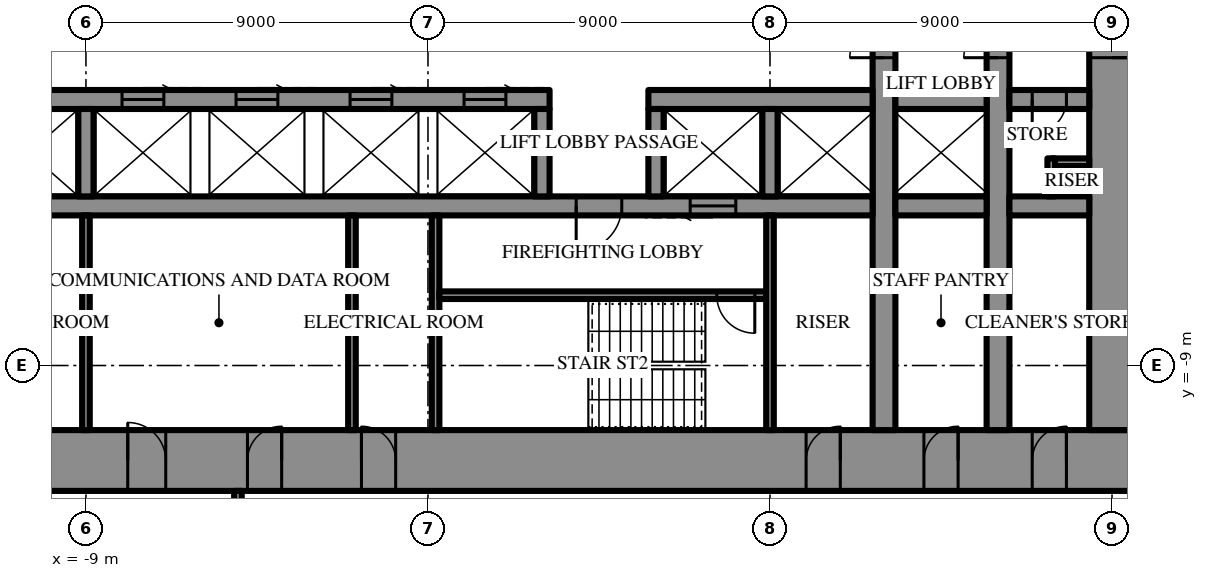
"""IFC4 building model, lengths in metres.
Left out: names, types, materials, properties, quantities, classifications, styles, units other than length and angle.
Written with IfcOpenShell. Run it as: python <this file> out.ifc"""

import sys

from ifc_helpers import new_model, si_unit, direction, frame, frame_2d, origin, place, context, subcontext, project, spatial, rectangle, extrude, element, fill, save


model = new_model("IFC4")
c1 = context("Model", 3, precision=1e-05, world=origin(), true_north=direction((0.0, 1.0)))
c2 = subcontext(c1, "Body", "Model", "MODEL_VIEW")
j1 = project(units=[si_unit("LENGTHUNIT", "METRE"), si_unit("PLANEANGLEUNIT", "RADIAN")], contexts=[c1])
p1 = place(None, origin())
s1 = spatial("IfcSite", under=j1, at=p1, CompositionType="ELEMENT")
p2 = place(p1, origin())
s2 = spatial("IfcBuilding", under=s1, at=p2, CompositionType="ELEMENT")
p3 = place(p2, frame((0.0, 0.0, 178.3)))
s3 = spatial("IfcBuildingStorey", under=s2, at=p3, CompositionType="ELEMENT", Elevation=178.3)
p4 = place(p3, frame((18.6, -11.5, 0.0), z_axis=(0.0, 0.0, 1.0), x_axis=(-1.0, 0.0, 0.0)))
e1 = element("IfcWall", 1, at=p4, inside=s3, PredefinedType="SHEAR", context=c2, shape_type="SweptSolid", body=[
    extrude(rectangle(XDim=37.2, YDim=1.6, at=frame_2d((18.6, 0.0))), origin(), (0.0, 0.0, 1.0), 4.2),
])
p5 = place(p4, frame((19.45, 0.0, 0.0)))
e2 = element("IfcOpeningElement", 2, at=p5, cuts=e1, PredefinedType="OPENING", context=c2, shape_type="SweptSolid", body=[
    extrude(rectangle(XDim=0.9, YDim=2.2, at=frame_2d((0.45, 1.1))), frame((0.0, 0.81, 0.0), z_axis=(0.0, -1.0, 0.0), x_axis=(1.0, 0.0, 0.0)), (0.0, 0.0, 1.0), 1.62),
])
p6 = place(p4, frame((22.45, 0.0, 0.0)))
e3 = element("IfcOpeningElement", 3, at=p6, cuts=e1, PredefinedType="OPENING", context=c2, shape_type="SweptSolid", body=[
    extrude(rectangle(XDim=0.9, YDim=2.2, at=frame_2d((0.45, 1.1))), frame((0.0, 0.81, 0.0), z_axis=(0.0, -1.0, 0.0), x_axis=(1.0, 0.0, 0.0)), (0.0, 0.0, 1.0), 1.62),
])
p7 = place(p4, frame((25.5, 0.0, 0.0)))
e4 = element("IfcOpeningElement", 4, at=p7, cuts=e1, PredefinedType="OPENING", context=c2, shape_type="SweptSolid", body=[
    extrude(rectangle(XDim=1.0, YDim=2.2, at=frame_2d((0.5, 1.1))), frame((0.0, 0.81, 0.0), z_axis=(0.0, -1.0, 0.0), x_axis=(1.0, 0.0, 0.0)), (0.0, 0.0, 1.0), 1.62),
])
p8 = place(p4, frame((1.8, 0.0, 0.0)))
e5 = element("IfcOpeningElement", 5, at=p8, cuts=e1, PredefinedType="OPENING", context=c2, shape_type="SweptSolid", body=[
    extrude(rectangle(XDim=0.9, YDim=2.2, at=frame_2d((0.45, 1.1))), frame((0.0, 0.81, 0.0), z_axis=(0.0, -1.0, 0.0), x_axis=(1.0, 0.0, 0.0)), (0.0, 0.0, 1.0), 1.62),
])
p9 = place(p4, frame((4.65, 0.0, 0.0)))
e6 = element("IfcOpeningElement", 6, at=p9, cuts=e1, PredefinedType="OPENING", context=c2, shape_type="SweptSolid", body=[
    extrude(rectangle(XDim=0.9, YDim=2.2, at=frame_2d((0.45, 1.1))), frame((0.0, 0.81, 0.0), z_axis=(0.0, -1.0, 0.0), x_axis=(1.0, 0.0, 0.0)), (0.0, 0.0, 1.0), 1.62),
])
p10 = place(p4, frame((7.75, 0.0, 0.0)))
e7 = element("IfcOpeningElement", 7, at=p10, cuts=e1, PredefinedType="OPENING", context=c2, shape_type="SweptSolid", body=[
    extrude(rectangle(XDim=0.9, YDim=2.2, at=frame_2d((0.45, 1.1))), frame((0.0, 0.81, 0.0), z_axis=(0.0, -1.0, 0.0), x_axis=(1.0, 0.0, 0.0)), (0.0, 0.0, 1.0), 1.62),
])
p11 = place(p4, frame((28.55, 0.0, 0.0)))
e8 = element("IfcOpeningElement", 8, at=p11, cuts=e1, PredefinedType="OPENING", context=c2, shape_type="SweptSolid", body=[
    extrude(rectangle(XDim=0.9, YDim=2.2, at=frame_2d((0.45, 1.1))), frame((0.0, 0.81, 0.0), z_axis=(0.0, -1.0, 0.0), x_axis=(1.0, 0.0, 0.0)), (0.0, 0.0, 1.0), 1.62),
])
p12 = place(p4, frame((31.65, 0.0, 0.0)))
e9 = element("IfcOpeningElement", 9, at=p12, cuts=e1, PredefinedType="OPENING", context=c2, shape_type="SweptSolid", body=[
    extrude(rectangle(XDim=0.9, YDim=2.2, at=frame_2d((0.45, 1.1))), frame((0.0, 0.81, 0.0), z_axis=(0.0, -1.0, 0.0), x_axis=(1.0, 0.0, 0.0)), (0.0, 0.0, 1.0), 1.62),
])
p13 = place(p4, frame((34.5, 0.0, 0.0)))
e10 = element("IfcOpeningElement", 10, at=p13, cuts=e1, PredefinedType="OPENING", context=c2, shape_type="SweptSolid", body=[
    extrude(rectangle(XDim=0.9, YDim=2.2, at=frame_2d((0.45, 1.1))), frame((0.0, 0.81, 0.0), z_axis=(0.0, -1.0, 0.0), x_axis=(1.0, 0.0, 0.0)), (0.0, 0.0, 1.0), 1.62),
])
p14 = place(p3, frame((18.0, -10.7, 0.0), z_axis=(0.0, 0.0, 1.0), x_axis=(0.0, 1.0, 0.0)))
e11 = element("IfcWall", 11, at=p14, inside=s3, PredefinedType="SHEAR", context=c2, shape_type="SweptSolid", body=[
    extrude(rectangle(XDim=21.4, YDim=1.2, at=frame_2d((10.7, 0.0))), origin(), (0.0, 0.0, 1.0), 4.2),
])
p15 = place(p14, frame((9.8, 0.0, 0.0)))
e12 = element("IfcOpeningElement", 12, at=p15, cuts=e11, PredefinedType="OPENING", context=c2, shape_type="SweptSolid", body=[
    extrude(rectangle(XDim=1.8, YDim=2.4, at=frame_2d((0.9, 1.2))), frame((0.0, 0.61, 0.0), z_axis=(0.0, -1.0, 0.0), x_axis=(1.0, 0.0, 0.0)), (0.0, 0.0, 1.0), 1.22),
])
p16 = place(p3, frame((12.0, -10.7, 0.0), z_axis=(0.0, 0.0, 1.0), x_axis=(0.0, 1.0, 0.0)))
e13 = element("IfcWall", 13, at=p16, inside=s3, PredefinedType="SHEAR", context=c2, shape_type="SweptSolid", body=[
    extrude(rectangle(XDim=21.4, YDim=0.6, at=frame_2d((10.7, 0.0))), origin(), (0.0, 0.0, 1.0), 4.2),
])
p17 = place(p16, frame((9.8, 0.0, 0.0)))
e14 = element("IfcOpeningElement", 14, at=p17, cuts=e13, PredefinedType="OPENING", context=c2, shape_type="SweptSolid", body=[
    extrude(rectangle(XDim=1.8, YDim=2.4, at=frame_2d((0.9, 1.2))), frame((0.0, 0.31, 0.0), z_axis=(0.0, -1.0, 0.0), x_axis=(1.0, 0.0, 0.0)), (0.0, 0.0, 1.0), 0.62),
])
p18 = place(p3, frame((15.0, -10.7, 0.0), z_axis=(0.0, 0.0, 1.0), x_axis=(0.0, 1.0, 0.0)))
e15 = element("IfcWall", 15, at=p18, inside=s3, PredefinedType="SHEAR", context=c2, shape_type="SweptSolid", body=[
    extrude(rectangle(XDim=21.4, YDim=0.6, at=frame_2d((10.7, 0.0))), origin(), (0.0, 0.0, 1.0), 4.2),
])
p19 = place(p18, frame((9.8, 0.0, 0.0)))
e16 = element("IfcOpeningElement", 16, at=p19, cuts=e15, PredefinedType="OPENING", context=c2, shape_type="SweptSolid", body=[
    extrude(rectangle(XDim=1.8, YDim=2.4, at=frame_2d((0.9, 1.2))), frame((0.0, 0.31, 0.0), z_axis=(0.0, -1.0, 0.0), x_axis=(1.0, 0.0, 0.0)), (0.0, 0.0, 1.0), 0.62),
])
p20 = place(p3, frame((17.4, -2.0, 0.0), z_axis=(0.0, 0.0, 1.0), x_axis=(-1.0, 0.0, 0.0)))
e17 = element("IfcWall", 17, at=p20, inside=s3, PredefinedType="SHEAR", context=c2, shape_type="SweptSolid", body=[
    extrude(rectangle(XDim=2.1, YDim=0.5, at=frame_2d((1.05, 0.0))), origin(), (0.0, 0.0, 1.0), 4.2),
])
p21 = place(p20, frame((0.6, 0.0, 0.0)))
e18 = element("IfcOpeningElement", 18, at=p21, cuts=e17, PredefinedType="OPENING", context=c2, shape_type="SweptSolid", body=[
    extrude(rectangle(XDim=0.9, YDim=2.2, at=frame_2d((0.45, 1.1))), frame((0.0, 0.26, 0.0), z_axis=(0.0, -1.0, 0.0), x_axis=(1.0, 0.0, 0.0)), (0.0, 0.0, 1.0), 0.52),
])
p22 = place(p3, frame((14.7, -2.0, 0.0), z_axis=(0.0, 0.0, 1.0), x_axis=(-1.0, 0.0, 0.0)))
e19 = element("IfcWall", 19, at=p22, inside=s3, PredefinedType="SHEAR", context=c2, shape_type="SweptSolid", body=[
    extrude(rectangle(XDim=2.4, YDim=0.5, at=frame_2d((1.2, 0.0))), origin(), (0.0, 0.0, 1.0), 4.2),
])
p23 = place(p3, frame((11.7, -2.0, 0.0), z_axis=(0.0, 0.0, 1.0), x_axis=(-1.0, 0.0, 0.0)))
e20 = element("IfcWall", 20, at=p23, inside=s3, PredefinedType="SHEAR", context=c2, shape_type="SweptSolid", body=[
    extrude(rectangle(XDim=5.9, YDim=0.5, at=frame_2d((2.95, 0.0))), origin(), (0.0, 0.0, 1.0), 4.2),
])
p24 = place(p3, frame((3.2, -2.0, 0.0), z_axis=(0.0, 0.0, 1.0), x_axis=(-1.0, 0.0, 0.0)))
e21 = element("IfcWall", 21, at=p24, inside=s3, PredefinedType="SHEAR", context=c2, shape_type="SweptSolid", body=[
    extrude(rectangle(XDim=14.9, YDim=0.5, at=frame_2d((7.45, 0.0))), origin(), (0.0, 0.0, 1.0), 4.2),
])
p25 = place(p24, frame((1.15, 0.0, 0.0)))
e22 = element("IfcOpeningElement", 22, at=p25, cuts=e21, PredefinedType="OPENING", context=c2, shape_type="SweptSolid", body=[
    extrude(rectangle(XDim=1.1, YDim=2.2, at=frame_2d((0.55, 1.1))), frame((0.0, 0.26, 0.0), z_axis=(0.0, -1.0, 0.0), x_axis=(1.0, 0.0, 0.0)), (0.0, 0.0, 1.0), 0.52),
])
p26 = place(p24, frame((4.15, 0.0, 0.0)))
e23 = element("IfcOpeningElement", 23, at=p26, cuts=e21, PredefinedType="OPENING", context=c2, shape_type="SweptSolid", body=[
    extrude(rectangle(XDim=1.1, YDim=2.2, at=frame_2d((0.55, 1.1))), frame((0.0, 0.26, 0.0), z_axis=(0.0, -1.0, 0.0), x_axis=(1.0, 0.0, 0.0)), (0.0, 0.0, 1.0), 0.52),
])
p27 = place(p24, frame((7.15, 0.0, 0.0)))
e24 = element("IfcOpeningElement", 24, at=p27, cuts=e21, PredefinedType="OPENING", context=c2, shape_type="SweptSolid", body=[
    extrude(rectangle(XDim=1.1, YDim=2.2, at=frame_2d((0.55, 1.1))), frame((0.0, 0.26, 0.0), z_axis=(0.0, -1.0, 0.0), x_axis=(1.0, 0.0, 0.0)), (0.0, 0.0, 1.0), 0.52),
])
p28 = place(p24, frame((10.15, 0.0, 0.0)))
e25 = element("IfcOpeningElement", 25, at=p28, cuts=e21, PredefinedType="OPENING", context=c2, shape_type="SweptSolid", body=[
    extrude(rectangle(XDim=1.1, YDim=2.2, at=frame_2d((0.55, 1.1))), frame((0.0, 0.26, 0.0), z_axis=(0.0, -1.0, 0.0), x_axis=(1.0, 0.0, 0.0)), (0.0, 0.0, 1.0), 0.52),
])
p29 = place(p3, frame((17.4, -4.8, 0.0), z_axis=(0.0, 0.0, 1.0), x_axis=(-1.0, 0.0, 0.0)))
e26 = element("IfcWall", 26, at=p29, inside=s3, PredefinedType="SHEAR", context=c2, shape_type="SweptSolid", body=[
    extrude(rectangle(XDim=2.1, YDim=0.5, at=frame_2d((1.05, 0.0))), origin(), (0.0, 0.0, 1.0), 4.2),
])
p30 = place(p3, frame((14.7, -4.8, 0.0), z_axis=(0.0, 0.0, 1.0), x_axis=(-1.0, 0.0, 0.0)))
e27 = element("IfcWall", 27, at=p30, inside=s3, PredefinedType="SHEAR", context=c2, shape_type="SweptSolid", body=[
    extrude(rectangle(XDim=2.4, YDim=0.5, at=frame_2d((1.2, 0.0))), origin(), (0.0, 0.0, 1.0), 4.2),
])
p31 = place(p3, frame((11.7, -4.8, 0.0), z_axis=(0.0, 0.0, 1.0), x_axis=(-1.0, 0.0, 0.0)))
e28 = element("IfcWall", 28, at=p31, inside=s3, PredefinedType="SHEAR", context=c2, shape_type="SweptSolid", body=[
    extrude(rectangle(XDim=23.4, YDim=0.5, at=frame_2d((11.7, 0.0))), origin(), (0.0, 0.0, 1.0), 4.2),
])
p32 = place(p31, frame((6.6, 0.0, 0.0)))
e29 = element("IfcOpeningElement", 29, at=p32, cuts=e28, PredefinedType="OPENING", context=c2, shape_type="SweptSolid", body=[
    extrude(rectangle(XDim=1.2, YDim=2.2, at=frame_2d((0.6, 1.1))), frame((0.0, 0.26, 0.0), z_axis=(0.0, -1.0, 0.0), x_axis=(1.0, 0.0, 0.0)), (0.0, 0.0, 1.0), 0.52),
])
p33 = place(p31, frame((3.6, 0.0, 0.0)))
e30 = element("IfcOpeningElement", 30, at=p33, cuts=e28, PredefinedType="OPENING", context=c2, shape_type="SweptSolid", body=[
    extrude(rectangle(XDim=1.2, YDim=2.2, at=frame_2d((0.6, 1.1))), frame((0.0, 0.26, 0.0), z_axis=(0.0, -1.0, 0.0), x_axis=(1.0, 0.0, 0.0)), (0.0, 0.0, 1.0), 0.52),
])
for number, where, z_axis, x_axis in (
    (31, (9.0, -2.25, 0.0), (0.0, 0.0, 1.0), (0.0, -1.0, 0.0)),
    (32, (6.0, -2.25, 0.0), (0.0, 0.0, 1.0), (0.0, -1.0, 0.0)),
    (33, (3.0, -2.25, 0.0), (0.0, 0.0, 1.0), (0.0, -1.0, 0.0)),
    (34, (-9.0, -2.25, 0.0), (0.0, 0.0, 1.0), (0.0, -1.0, 0.0)),
):
    element("IfcWall", number, at=place(p3, frame(where, z_axis=z_axis, x_axis=x_axis)), inside=s3, PredefinedType="SHEAR", context=c2, shape_type="SweptSolid", body=[
        extrude(rectangle(XDim=2.3, YDim=0.4, at=frame_2d((1.15, 0.0))), origin(), (0.0, 0.0, 1.0), 4.2),
    ])
p34 = place(p3, frame((0.2, -5.05, 0.0), z_axis=(0.0, 0.0, 1.0), x_axis=(0.0, -1.0, 0.0)))
e35 = element("IfcWall", 35, at=p34, inside=s3, PredefinedType="SHEAR", context=c2, shape_type="SweptSolid", body=[
    extrude(rectangle(XDim=5.65, YDim=0.2, at=frame_2d((2.825, 0.0))), origin(), (0.0, 0.0, 1.0), 4.2),
])
p35 = place(p3, frame((8.9, -7.15, 0.0), z_axis=(0.0, 0.0, 1.0), x_axis=(-1.0, 0.0, 0.0)))
e36 = element("IfcWall", 36, at=p35, inside=s3, PredefinedType="SHEAR", context=c2, shape_type="SweptSolid", body=[
    extrude(rectangle(XDim=8.6, YDim=0.2, at=frame_2d((4.3, 0.0))), origin(), (0.0, 0.0, 1.0), 4.2),
])
p36 = place(p35, frame((0.3, 0.0, 0.0)))
e37 = element("IfcOpeningElement", 37, at=p36, cuts=e36, PredefinedType="OPENING", context=c2, shape_type="SweptSolid", body=[
    extrude(rectangle(XDim=1.0, YDim=2.2, at=frame_2d((0.5, 1.1))), frame((0.0, 0.11, 0.0), z_axis=(0.0, -1.0, 0.0), x_axis=(1.0, 0.0, 0.0)), (0.0, 0.0, 1.0), 0.22),
])
for number, where, z_axis, x_axis in (
    (38, (9.0, -5.05, 0.0), (0.0, 0.0, 1.0), (0.0, -1.0, 0.0)),
    (39, (-9.0, -5.05, 0.0), (0.0, 0.0, 1.0), (0.0, -1.0, 0.0)),
    (40, (-2.0, -5.05, 0.0), (0.0, 0.0, 1.0), (0.0, -1.0, 0.0)),
):
    element("IfcWall", number, at=place(p3, frame(where, z_axis=z_axis, x_axis=x_axis)), inside=s3, PredefinedType="PARTITIONING", context=c2, shape_type="SweptSolid", body=[
        extrude(rectangle(XDim=5.65, YDim=0.2, at=frame_2d((2.825, 0.0))), origin(), (0.0, 0.0, 1.0), 4.0),
    ])
for number, where, z_axis, x_axis in (
    (41, (17.4, -3.65, 0.0), (0.0, 0.0, 1.0), (-1.0, 0.0, 0.0)),
    (42, (16.4, -3.55, 0.0), (0.0, 0.0, 1.0), (0.0, -1.0, 0.0)),
):
    element("IfcWall", number, at=place(p3, frame(where, z_axis=z_axis, x_axis=x_axis)), inside=s3, PredefinedType="PARTITIONING", context=c2, shape_type="SweptSolid", body=[
        extrude(rectangle(XDim=1.0, YDim=0.2, at=frame_2d((0.5, 0.0))), origin(), (0.0, 0.0, 1.0), 4.0),
    ])
p37 = place(p3, frame((-5.0, -12.3, 0.0), z_axis=(0.0, 0.0, 1.0), x_axis=(0.0, -1.0, 0.0)))
e43 = element("IfcWall", 43, at=p37, inside=s3, PredefinedType="PARTITIONING", context=c2, shape_type="SweptSolid", body=[
    extrude(rectangle(XDim=1.7, YDim=0.2, at=frame_2d((0.85, 0.0))), origin(), (0.0, 0.0, 1.0), 2.992),
])
p38 = place(p37, frame((0.35, 0.0, 0.0)))
e44 = element("IfcOpeningElement", 44, at=p38, cuts=e43, PredefinedType="OPENING", context=c2, shape_type="SweptSolid", body=[
    extrude(rectangle(XDim=1.0, YDim=2.2, at=frame_2d((0.5, 1.1))), frame((0.0, 0.11, 0.0), z_axis=(0.0, -1.0, 0.0), x_axis=(1.0, 0.0, 0.0)), (0.0, 0.0, 1.0), 0.22),
])
p39 = place(p15, frame((1.8, 0.0, 0.0), z_axis=(0.0, 0.0, 1.0), x_axis=(-1.0, 0.0, 0.0)))
e45 = element("IfcDoor", 45, at=p39, inside=s3, OperationType="DOUBLE_DOOR_SINGLE_SWING", PredefinedType="DOOR", context=c2, shape_type="SweptSolid", body=[
    extrude(rectangle(XDim=1.8, YDim=2.4, at=frame_2d((0.9, 1.2))), frame((0.0, 0.025, 0.0), z_axis=(0.0, -1.0, 0.0), x_axis=(1.0, 0.0, 0.0)), (0.0, 0.0, 1.0), 0.05),
])
fill(e12, e45)
p40 = place(p32, origin())
e46 = element("IfcDoor", 46, at=p40, inside=s3, OperationType="SINGLE_SWING_LEFT", PredefinedType="DOOR", context=c2, shape_type="SweptSolid", body=[
    extrude(rectangle(XDim=1.2, YDim=2.2, at=frame_2d((0.6, 1.1))), frame((0.0, 0.025, 0.0), z_axis=(0.0, -1.0, 0.0), x_axis=(1.0, 0.0, 0.0)), (0.0, 0.0, 1.0), 0.05),
])
fill(e29, e46)
p41 = place(p36, origin())
e47 = element("IfcDoor", 47, at=p41, inside=s3, OperationType="SINGLE_SWING_RIGHT", PredefinedType="DOOR", context=c2, shape_type="SweptSolid", body=[
    extrude(rectangle(XDim=1.0, YDim=2.2, at=frame_2d((0.5, 1.1))), frame((0.0, 0.025, 0.0), z_axis=(0.0, -1.0, 0.0), x_axis=(1.0, 0.0, 0.0)), (0.0, 0.0, 1.0), 0.05),
])
fill(e37, e47)
p42 = place(p5, frame((0.9, 0.0, 0.0), z_axis=(0.0, 0.0, 1.0), x_axis=(-1.0, 0.0, 0.0)))
e48 = element("IfcDoor", 48, at=p42, inside=s3, OperationType="SINGLE_SWING_RIGHT", PredefinedType="DOOR", context=c2, shape_type="SweptSolid", body=[
    extrude(rectangle(XDim=0.9, YDim=2.2, at=frame_2d((0.45, 1.1))), frame((0.0, 0.025, 0.0), z_axis=(0.0, -1.0, 0.0), x_axis=(1.0, 0.0, 0.0)), (0.0, 0.0, 1.0), 0.05),
])
fill(e2, e48)
p43 = place(p6, frame((0.9, 0.0, 0.0), z_axis=(0.0, 0.0, 1.0), x_axis=(-1.0, 0.0, 0.0)))
e49 = element("IfcDoor", 49, at=p43, inside=s3, OperationType="SINGLE_SWING_LEFT", PredefinedType="DOOR", context=c2, shape_type="SweptSolid", body=[
    extrude(rectangle(XDim=0.9, YDim=2.2, at=frame_2d((0.45, 1.1))), frame((0.0, 0.025, 0.0), z_axis=(0.0, -1.0, 0.0), x_axis=(1.0, 0.0, 0.0)), (0.0, 0.0, 1.0), 0.05),
])
fill(e3, e49)
p44 = place(p7, frame((1.0, 0.0, 0.0), z_axis=(0.0, 0.0, 1.0), x_axis=(-1.0, 0.0, 0.0)))
e50 = element("IfcDoor", 50, at=p44, inside=s3, OperationType="SINGLE_SWING_RIGHT", PredefinedType="DOOR", context=c2, shape_type="SweptSolid", body=[
    extrude(rectangle(XDim=1.0, YDim=2.2, at=frame_2d((0.5, 1.1))), frame((0.0, 0.025, 0.0), z_axis=(0.0, -1.0, 0.0), x_axis=(1.0, 0.0, 0.0)), (0.0, 0.0, 1.0), 0.05),
])
fill(e4, e50)
p45 = place(p8, frame((0.9, 0.0, 0.0), z_axis=(0.0, 0.0, 1.0), x_axis=(-1.0, 0.0, 0.0)))
e51 = element("IfcDoor", 51, at=p45, inside=s3, OperationType="SINGLE_SWING_LEFT", PredefinedType="DOOR", context=c2, shape_type="SweptSolid", body=[
    extrude(rectangle(XDim=0.9, YDim=2.2, at=frame_2d((0.45, 1.1))), frame((0.0, 0.025, 0.0), z_axis=(0.0, -1.0, 0.0), x_axis=(1.0, 0.0, 0.0)), (0.0, 0.0, 1.0), 0.05),
])
fill(e5, e51)
p46 = place(p9, frame((0.9, 0.0, 0.0), z_axis=(0.0, 0.0, 1.0), x_axis=(-1.0, 0.0, 0.0)))
e52 = element("IfcDoor", 52, at=p46, inside=s3, OperationType="SINGLE_SWING_LEFT", PredefinedType="DOOR", context=c2, shape_type="SweptSolid", body=[
    extrude(rectangle(XDim=0.9, YDim=2.2, at=frame_2d((0.45, 1.1))), frame((0.0, 0.025, 0.0), z_axis=(0.0, -1.0, 0.0), x_axis=(1.0, 0.0, 0.0)), (0.0, 0.0, 1.0), 0.05),
])
fill(e6, e52)
p47 = place(p10, frame((0.9, 0.0, 0.0), z_axis=(0.0, 0.0, 1.0), x_axis=(-1.0, 0.0, 0.0)))
e53 = element("IfcDoor", 53, at=p47, inside=s3, OperationType="SINGLE_SWING_LEFT", PredefinedType="DOOR", context=c2, shape_type="SweptSolid", body=[
    extrude(rectangle(XDim=0.9, YDim=2.2, at=frame_2d((0.45, 1.1))), frame((0.0, 0.025, 0.0), z_axis=(0.0, -1.0, 0.0), x_axis=(1.0, 0.0, 0.0)), (0.0, 0.0, 1.0), 0.05),
])
fill(e7, e53)
p48 = place(p21, origin())
e54 = element("IfcDoor", 54, at=p48, inside=s3, OperationType="SINGLE_SWING_LEFT", PredefinedType="DOOR", context=c2, shape_type="SweptSolid", body=[
    extrude(rectangle(XDim=0.9, YDim=2.2, at=frame_2d((0.45, 1.1))), frame((0.0, 0.025, 0.0), z_axis=(0.0, -1.0, 0.0), x_axis=(1.0, 0.0, 0.0)), (0.0, 0.0, 1.0), 0.05),
])
fill(e18, e54)
p49 = place(p17, origin())
e55 = element("IfcDoor", 55, at=p49, inside=s3, OperationType="DOUBLE_DOOR_SINGLE_SWING", PredefinedType="DOOR", context=c2, shape_type="SweptSolid", body=[
    extrude(rectangle(XDim=1.8, YDim=2.4, at=frame_2d((0.9, 1.2))), frame((0.0, 0.025, 0.0), z_axis=(0.0, -1.0, 0.0), x_axis=(1.0, 0.0, 0.0)), (0.0, 0.0, 1.0), 0.05),
])
fill(e14, e55)
p50 = place(p19, origin())
e56 = element("IfcDoor", 56, at=p50, inside=s3, OperationType="DOUBLE_DOOR_SINGLE_SWING", PredefinedType="DOOR", context=c2, shape_type="SweptSolid", body=[
    extrude(rectangle(XDim=1.8, YDim=2.4, at=frame_2d((0.9, 1.2))), frame((0.0, 0.025, 0.0), z_axis=(0.0, -1.0, 0.0), x_axis=(1.0, 0.0, 0.0)), (0.0, 0.0, 1.0), 0.05),
])
fill(e16, e56)
p51 = place(p33, origin())
e57 = element("IfcDoor", 57, at=p51, inside=s3, OperationType="SLIDING_TO_LEFT", PredefinedType="DOOR", context=c2, shape_type="SweptSolid", body=[
    extrude(rectangle(XDim=1.2, YDim=2.2, at=frame_2d((0.6, 1.1))), frame((0.0, 0.025, 0.0), z_axis=(0.0, -1.0, 0.0), x_axis=(1.0, 0.0, 0.0)), (0.0, 0.0, 1.0), 0.05),
])
fill(e30, e57)
p52 = place(p25, frame((1.1, 0.0, 0.0), z_axis=(0.0, 0.0, 1.0), x_axis=(-1.0, 0.0, 0.0)))
e58 = element("IfcDoor", 58, at=p52, inside=s3, OperationType="SLIDING_TO_LEFT", PredefinedType="DOOR", context=c2, shape_type="SweptSolid", body=[
    extrude(rectangle(XDim=1.1, YDim=2.2, at=frame_2d((0.55, 1.1))), frame((0.0, 0.025, 0.0), z_axis=(0.0, -1.0, 0.0), x_axis=(1.0, 0.0, 0.0)), (0.0, 0.0, 1.0), 0.05),
])
fill(e22, e58)
p53 = place(p26, frame((1.1, 0.0, 0.0), z_axis=(0.0, 0.0, 1.0), x_axis=(-1.0, 0.0, 0.0)))
e59 = element("IfcDoor", 59, at=p53, inside=s3, OperationType="SLIDING_TO_LEFT", PredefinedType="DOOR", context=c2, shape_type="SweptSolid", body=[
    extrude(rectangle(XDim=1.1, YDim=2.2, at=frame_2d((0.55, 1.1))), frame((0.0, 0.025, 0.0), z_axis=(0.0, -1.0, 0.0), x_axis=(1.0, 0.0, 0.0)), (0.0, 0.0, 1.0), 0.05),
])
fill(e23, e59)
p54 = place(p27, frame((1.1, 0.0, 0.0), z_axis=(0.0, 0.0, 1.0), x_axis=(-1.0, 0.0, 0.0)))
e60 = element("IfcDoor", 60, at=p54, inside=s3, OperationType="SLIDING_TO_LEFT", PredefinedType="DOOR", context=c2, shape_type="SweptSolid", body=[
    extrude(rectangle(XDim=1.1, YDim=2.2, at=frame_2d((0.55, 1.1))), frame((0.0, 0.025, 0.0), z_axis=(0.0, -1.0, 0.0), x_axis=(1.0, 0.0, 0.0)), (0.0, 0.0, 1.0), 0.05),
])
fill(e24, e60)
p55 = place(p28, frame((1.1, 0.0, 0.0), z_axis=(0.0, 0.0, 1.0), x_axis=(-1.0, 0.0, 0.0)))
e61 = element("IfcDoor", 61, at=p55, inside=s3, OperationType="SLIDING_TO_LEFT", PredefinedType="DOOR", context=c2, shape_type="SweptSolid", body=[
    extrude(rectangle(XDim=1.1, YDim=2.2, at=frame_2d((0.55, 1.1))), frame((0.0, 0.025, 0.0), z_axis=(0.0, -1.0, 0.0), x_axis=(1.0, 0.0, 0.0)), (0.0, 0.0, 1.0), 0.05),
])
fill(e25, e61)
save(model, sys.argv[1])
